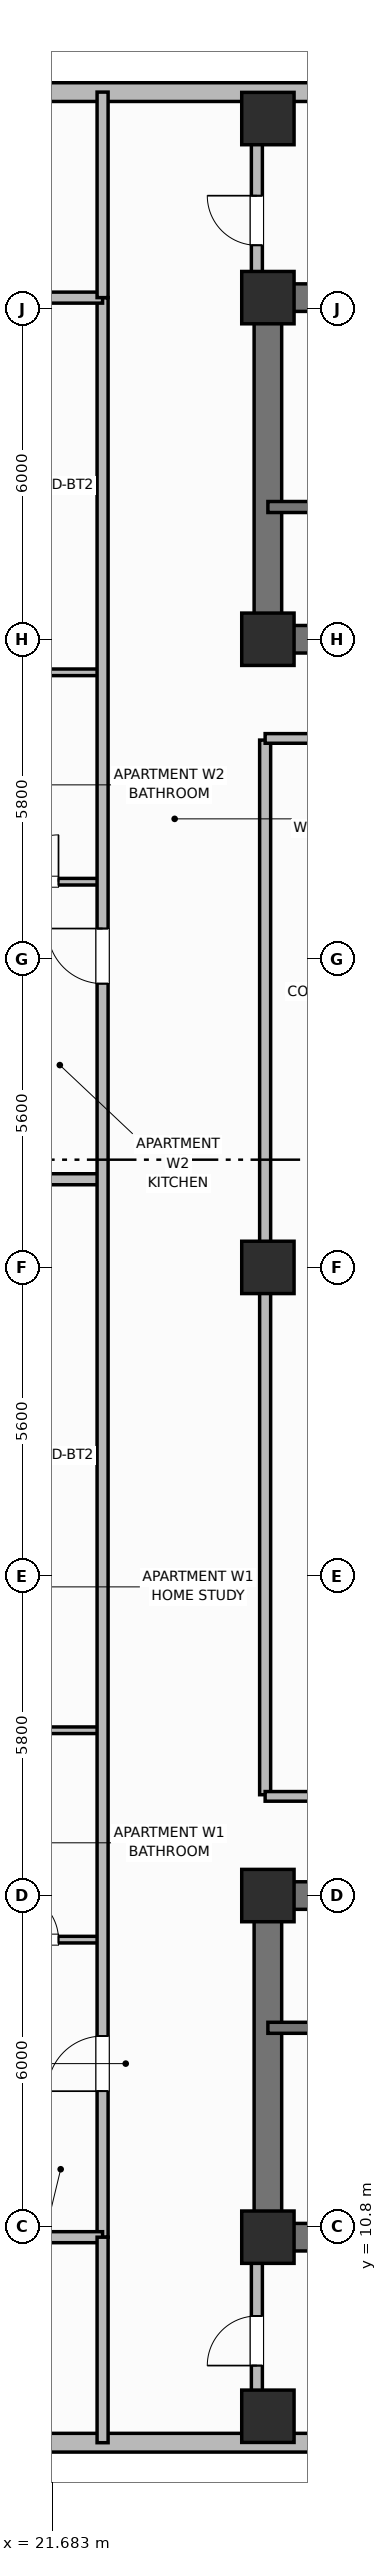
"""IFC4 building model, lengths in metres.
Left out: names, types, materials, properties, quantities, classifications, styles, units other than length and angle.
Written with IfcOpenShell. Run it as: python <this file> out.ifc"""

import sys

from ifc_helpers import new_model, si_unit, direction, frame, frame_2d, origin, origin_2d, place, context, subcontext, project, spatial, rectangle, extrude, element, fill, save


model = new_model("IFC4")
c1 = context("Model", 3, precision=1e-05, world=origin(), true_north=direction((0.0, 1.0)))
c2 = subcontext(c1, "Body", "Model", "MODEL_VIEW")
j1 = project(units=[si_unit("LENGTHUNIT", "METRE"), si_unit("PLANEANGLEUNIT", "RADIAN")], contexts=[c1])
p1 = place(None, origin())
s1 = spatial("IfcSite", under=j1, at=p1, CompositionType="ELEMENT")
p2 = place(p1, origin())
s2 = spatial("IfcBuilding", under=s1, at=p2, CompositionType="ELEMENT")
p3 = place(p2, frame((0.0, 0.0, 177.4)))
s3 = spatial("IfcBuildingStorey", under=s2, at=p3, CompositionType="ELEMENT", Elevation=177.4)
p4 = place(p3, frame((52.8, 10.6, 0.0), z_axis=(0.0, 0.0, 1.0), x_axis=(-1.0, 0.0, 0.0)))
e1 = element("IfcWall", 1, at=p4, inside=s3, PredefinedType="SHEAR", context=c2, shape_type="SweptSolid", body=[
    extrude(rectangle(XDim=27.2, YDim=0.5, at=frame_2d((13.6, 0.0))), origin(), (0.0, 0.0, 1.0), 3.7),
])
p5 = place(p3, frame((25.6, 10.85, 0.0), z_axis=(0.0, 0.0, 1.0), x_axis=(0.0, 1.0, 0.0)))
e2 = element("IfcWall", 2, at=p5, inside=s3, PredefinedType="SHEAR", context=c2, shape_type="SweptSolid", body=[
    extrude(rectangle(XDim=5.7, YDim=0.5, at=frame_2d((2.85, 0.0))), origin(), (0.0, 0.0, 1.0), 3.7),
])
p6 = place(p3, frame((25.6, 16.8, 0.0), z_axis=(0.0, 0.0, 1.0), x_axis=(1.0, 0.0, 0.0)))
e3 = element("IfcWall", 3, at=p6, inside=s3, PredefinedType="SHEAR", context=c2, shape_type="SweptSolid", body=[
    extrude(rectangle(XDim=27.2, YDim=0.5, at=frame_2d((13.6, 0.0))), origin(), (0.0, 0.0, 1.0), 3.7),
])
p7 = place(p6, frame((1.9, 0.0, 0.0)))
e4 = element("IfcOpeningElement", 4, at=p7, cuts=e3, PredefinedType="OPENING", context=c2, shape_type="SweptSolid", body=[
    extrude(rectangle(XDim=1.1, YDim=2.15, at=frame_2d((0.55, 1.075))), frame((0.0, 0.26, 0.0), z_axis=(0.0, -1.0, 0.0), x_axis=(1.0, 0.0, 0.0)), (0.0, 0.0, 1.0), 0.52),
])
p8 = place(p6, frame((13.0, 0.0, 0.0)))
e5 = element("IfcOpeningElement", 5, at=p8, cuts=e3, PredefinedType="OPENING", context=c2, shape_type="SweptSolid", body=[
    extrude(rectangle(XDim=1.2, YDim=2.15, at=frame_2d((0.6, 1.075))), frame((0.0, 0.26, 0.0), z_axis=(0.0, -1.0, 0.0), x_axis=(1.0, 0.0, 0.0)), (0.0, 0.0, 1.0), 0.52),
])
p9 = place(p6, frame((21.6, 0.0, 0.0)))
e6 = element("IfcOpeningElement", 6, at=p9, cuts=e3, PredefinedType="OPENING", context=c2, shape_type="SweptSolid", body=[
    extrude(rectangle(XDim=1.0, YDim=2.15, at=frame_2d((0.5, 1.075))), frame((0.0, 0.26, 0.0), z_axis=(0.0, -1.0, 0.0), x_axis=(1.0, 0.0, 0.0)), (0.0, 0.0, 1.0), 0.52),
])
p10 = place(p3, frame((25.6, 45.8, 0.0), z_axis=(0.0, 0.0, 1.0), x_axis=(1.0, 0.0, 0.0)))
e7 = element("IfcWall", 7, at=p10, inside=s3, PredefinedType="SHEAR", context=c2, shape_type="SweptSolid", body=[
    extrude(rectangle(XDim=27.2, YDim=0.5, at=frame_2d((13.6, 0.0))), origin(), (0.0, 0.0, 1.0), 3.7),
])
p11 = place(p3, frame((25.6, 39.85, 0.0), z_axis=(0.0, 0.0, 1.0), x_axis=(0.0, 1.0, 0.0)))
e8 = element("IfcWall", 8, at=p11, inside=s3, PredefinedType="SHEAR", context=c2, shape_type="SweptSolid", body=[
    extrude(rectangle(XDim=5.7, YDim=0.5, at=frame_2d((2.85, 0.0))), origin(), (0.0, 0.0, 1.0), 3.7),
])
p12 = place(p3, frame((52.8, 39.6, 0.0), z_axis=(0.0, 0.0, 1.0), x_axis=(-1.0, 0.0, 0.0)))
e9 = element("IfcWall", 9, at=p12, inside=s3, PredefinedType="SHEAR", context=c2, shape_type="SweptSolid", body=[
    extrude(rectangle(XDim=27.2, YDim=0.5, at=frame_2d((13.6, 0.0))), origin(), (0.0, 0.0, 1.0), 3.7),
])
p13 = place(p12, frame((24.2, 0.0, 0.0)))
e10 = element("IfcOpeningElement", 10, at=p13, cuts=e9, PredefinedType="OPENING", context=c2, shape_type="SweptSolid", body=[
    extrude(rectangle(XDim=1.1, YDim=2.15, at=frame_2d((0.55, 1.075))), frame((0.0, 0.26, 0.0), z_axis=(0.0, -1.0, 0.0), x_axis=(1.0, 0.0, 0.0)), (0.0, 0.0, 1.0), 0.52),
])
p14 = place(p12, frame((15.1, 0.0, 0.0)))
e11 = element("IfcOpeningElement", 11, at=p14, cuts=e9, PredefinedType="OPENING", context=c2, shape_type="SweptSolid", body=[
    extrude(rectangle(XDim=1.2, YDim=2.15, at=frame_2d((0.6, 1.075))), frame((0.0, 0.26, 0.0), z_axis=(0.0, -1.0, 0.0), x_axis=(1.0, 0.0, 0.0)), (0.0, 0.0, 1.0), 0.52),
])
p15 = place(p12, frame((11.6, 0.0, 0.0)))
e12 = element("IfcOpeningElement", 12, at=p15, cuts=e9, PredefinedType="OPENING", context=c2, shape_type="SweptSolid", body=[
    extrude(rectangle(XDim=0.9, YDim=2.1, at=frame_2d((0.45, 1.05))), frame((0.0, 0.26, 0.0), z_axis=(0.0, -1.0, 0.0), x_axis=(1.0, 0.0, 0.0)), (0.0, 0.0, 1.0), 0.52),
])
p16 = place(p12, frame((7.35, 0.0, 0.0)))
e13 = element("IfcOpeningElement", 13, at=p16, cuts=e9, PredefinedType="OPENING", context=c2, shape_type="SweptSolid", body=[
    extrude(rectangle(XDim=0.85, YDim=2.1, at=frame_2d((0.425, 1.05))), frame((0.0, 0.26, 0.0), z_axis=(0.0, -1.0, 0.0), x_axis=(1.0, 0.0, 0.0)), (0.0, 0.0, 1.0), 0.52),
])
p17 = place(p12, frame((3.6, 0.0, 0.0)))
e14 = element("IfcOpeningElement", 14, at=p17, cuts=e9, PredefinedType="OPENING", context=c2, shape_type="SweptSolid", body=[
    extrude(rectangle(XDim=1.0, YDim=2.15, at=frame_2d((0.5, 1.075))), frame((0.0, 0.26, 0.0), z_axis=(0.0, -1.0, 0.0), x_axis=(1.0, 0.0, 0.0)), (0.0, 0.0, 1.0), 0.52),
])
for number, where, z_axis, x_axis in (
    (15, (25.6, 10.6, 0.0), (0.0, 0.0, 1.0), (1.0, 0.0, 0.0)),
    (16, (25.6, 16.8, 0.0), (0.0, 0.0, 1.0), (1.0, 0.0, 0.0)),
    (17, (25.6, 39.6, 0.0), (0.0, 0.0, 1.0), (1.0, 0.0, 0.0)),
    (18, (25.6, 45.8, 0.0), (0.0, 0.0, 1.0), (1.0, 0.0, 0.0)),
    (19, (25.6, 28.2, 0.0), (0.0, 0.0, 1.0), (1.0, 0.0, 0.0)),
    (20, (25.6, 7.35, 0.0), (0.0, 0.0, 1.0), (1.0, 0.0, 0.0)),
    (21, (25.6, 49.05, 0.0), (0.0, 0.0, 1.0), (1.0, 0.0, 0.0)),
):
    element("IfcColumn", number, at=place(p3, frame(where, z_axis=z_axis, x_axis=x_axis)), inside=s3, PredefinedType="COLUMN", context=c2, shape_type="SweptSolid", body=[
        extrude(rectangle(XDim=0.95, YDim=0.95, at=origin_2d()), origin(), (0.0, 0.0, 1.0), 3.7),
    ])
p18 = place(p3, frame((20.2, 6.87, 0.0), z_axis=(0.0, 0.0, 1.0), x_axis=(1.0, 0.0, 0.0)))
e22 = element("IfcWall", 22, at=p18, inside=s3, PredefinedType="SOLIDWALL", context=c2, shape_type="SweptSolid", body=[
    extrude(rectangle(XDim=15.8, YDim=0.34, at=frame_2d((7.9, 0.0))), origin(), (0.0, 0.0, 1.0), 2.72),
])
p19 = place(p18, frame((7.962, 0.0, 0.7)))
e23 = element("IfcOpeningElement", 23, at=p19, cuts=e22, PredefinedType="OPENING", context=c2, shape_type="SweptSolid", body=[
    extrude(rectangle(XDim=2.1, YDim=1.9, at=frame_2d((1.05, 0.95))), frame((0.0, 0.18, 0.0), z_axis=(0.0, -1.0, 0.0), x_axis=(1.0, 0.0, 0.0)), (0.0, 0.0, 1.0), 0.36),
])
p20 = place(p18, frame((11.587, 0.0, 0.7)))
e24 = element("IfcOpeningElement", 24, at=p20, cuts=e22, PredefinedType="OPENING", context=c2, shape_type="SweptSolid", body=[
    extrude(rectangle(XDim=2.1, YDim=1.9, at=frame_2d((1.05, 0.95))), frame((0.0, 0.18, 0.0), z_axis=(0.0, -1.0, 0.0), x_axis=(1.0, 0.0, 0.0)), (0.0, 0.0, 1.0), 0.36),
])
p21 = place(p3, frame((27.55, 49.53, 0.0), z_axis=(0.0, 0.0, 1.0), x_axis=(-1.0, 0.0, 0.0)))
e25 = element("IfcWall", 25, at=p21, inside=s3, PredefinedType="SOLIDWALL", context=c2, shape_type="SweptSolid", body=[
    extrude(rectangle(XDim=7.35, YDim=0.34, at=frame_2d((3.675, 0.0))), origin(), (0.0, 0.0, 1.0), 2.72),
])
p22 = place(p3, frame((25.6, 14.4, 0.0), z_axis=(0.0, 0.0, 1.0), x_axis=(1.0, 0.0, 0.0)))
e26 = element("IfcWall", 26, at=p22, inside=s3, PredefinedType="SHEAR", context=c2, shape_type="SweptSolid", body=[
    extrude(rectangle(XDim=9.55, YDim=0.2, at=frame_2d((4.775, 0.0))), origin(), (0.0, 0.0, 1.0), 3.7),
])
p23 = place(p22, frame((1.05, 0.0, 0.0)))
e27 = element("IfcOpeningElement", 27, at=p23, cuts=e26, PredefinedType="OPENING", context=c2, shape_type="SweptSolid", body=[
    extrude(rectangle(XDim=1.1, YDim=2.15, at=frame_2d((0.55, 1.075))), frame((0.0, 0.11, 0.0), z_axis=(0.0, -1.0, 0.0), x_axis=(1.0, 0.0, 0.0)), (0.0, 0.0, 1.0), 0.22),
])
p24 = place(p3, frame((35.15, 42.0, 0.0), z_axis=(0.0, 0.0, 1.0), x_axis=(-1.0, 0.0, 0.0)))
e28 = element("IfcWall", 28, at=p24, inside=s3, PredefinedType="SHEAR", context=c2, shape_type="SweptSolid", body=[
    extrude(rectangle(XDim=9.55, YDim=0.2, at=frame_2d((4.775, 0.0))), origin(), (0.0, 0.0, 1.0), 3.7),
])
p25 = place(p24, frame((7.25, 0.0, 0.0)))
e29 = element("IfcOpeningElement", 29, at=p25, cuts=e28, PredefinedType="OPENING", context=c2, shape_type="SweptSolid", body=[
    extrude(rectangle(XDim=1.1, YDim=2.15, at=frame_2d((0.55, 1.075))), frame((0.0, 0.11, 0.0), z_axis=(0.0, -1.0, 0.0), x_axis=(1.0, 0.0, 0.0)), (0.0, 0.0, 1.0), 0.22),
])
p26 = place(p3, frame((25.55, 18.63, 0.0), z_axis=(0.0, 0.0, 1.0), x_axis=(0.0, 1.0, 0.0)))
e30 = element("IfcWall", 30, at=p26, inside=s3, PredefinedType="PARTITIONING", context=c2, shape_type="SweptSolid", body=[
    extrude(rectangle(XDim=19.14, YDim=0.2, at=frame_2d((9.57, 0.0))), origin(), (0.0, 0.0, 1.0), 2.55),
])
for number, where, z_axis, x_axis in (
    (31, (25.55, 18.6, 0.0), (0.0, 0.0, 1.0), (1.0, 0.0, 0.0)),
    (32, (25.55, 37.8, 0.0), (0.0, 0.0, 1.0), (1.0, 0.0, 0.0)),
):
    element("IfcWall", number, at=place(p3, frame(where, z_axis=z_axis, x_axis=x_axis)), inside=s3, PredefinedType="PARTITIONING", context=c2, shape_type="SweptSolid", body=[
        extrude(rectangle(XDim=3.5, YDim=0.175, at=frame_2d((1.75, 0.0))), origin(), (0.0, 0.0, 1.0), 2.55),
    ])
p27 = place(p3, frame((20.35, 16.0, 0.0), z_axis=(0.0, 0.0, 1.0), x_axis=(1.0, 0.0, 0.0)))
e33 = element("IfcWall", 33, at=p27, inside=s3, PredefinedType="PARTITIONING", context=c2, shape_type="SweptSolid", body=[
    extrude(rectangle(XDim=2.25, YDim=0.12, at=frame_2d((1.125, 0.0))), origin(), (0.0, 0.0, 1.0), 2.55),
])
p28 = place(p27, frame((0.6, 0.0, 0.0)))
e34 = element("IfcOpeningElement", 34, at=p28, cuts=e33, PredefinedType="OPENING", context=c2, shape_type="SweptSolid", body=[
    extrude(rectangle(XDim=0.85, YDim=2.1, at=frame_2d((0.425, 1.05))), frame((0.0, 0.07, 0.0), z_axis=(0.0, -1.0, 0.0), x_axis=(1.0, 0.0, 0.0)), (0.0, 0.0, 1.0), 0.14),
])
p29 = place(p3, frame((20.35, 19.8, 0.0), z_axis=(0.0, 0.0, 1.0), x_axis=(1.0, 0.0, 0.0)))
e35 = element("IfcWall", 35, at=p29, inside=s3, PredefinedType="PARTITIONING", context=c2, shape_type="SweptSolid", body=[
    extrude(rectangle(XDim=2.25, YDim=0.12, at=frame_2d((1.125, 0.0))), origin(), (0.0, 0.0, 1.0), 2.55),
])
p30 = place(p3, frame((16.97, 29.8, 0.0), z_axis=(0.0, 0.0, 1.0), x_axis=(1.0, 0.0, 0.0)))
e36 = element("IfcWall", 36, at=p30, inside=s3, PredefinedType="PARTITIONING", context=c2, shape_type="SweptSolid", body=[
    extrude(rectangle(XDim=5.63, YDim=0.2, at=frame_2d((2.815, 0.0))), origin(), (0.0, 0.0, 1.0), 2.55),
])
p31 = place(p3, frame((20.35, 35.2, 0.0), z_axis=(0.0, 0.0, 1.0), x_axis=(1.0, 0.0, 0.0)))
e37 = element("IfcWall", 37, at=p31, inside=s3, PredefinedType="PARTITIONING", context=c2, shape_type="SweptSolid", body=[
    extrude(rectangle(XDim=2.25, YDim=0.12, at=frame_2d((1.125, 0.0))), origin(), (0.0, 0.0, 1.0), 2.55),
])
p32 = place(p31, frame((0.6, 0.0, 0.0)))
e38 = element("IfcOpeningElement", 38, at=p32, cuts=e37, PredefinedType="OPENING", context=c2, shape_type="SweptSolid", body=[
    extrude(rectangle(XDim=0.85, YDim=2.1, at=frame_2d((0.425, 1.05))), frame((0.0, 0.07, 0.0), z_axis=(0.0, -1.0, 0.0), x_axis=(1.0, 0.0, 0.0)), (0.0, 0.0, 1.0), 0.14),
])
p33 = place(p3, frame((20.35, 39.0, 0.0), z_axis=(0.0, 0.0, 1.0), x_axis=(1.0, 0.0, 0.0)))
e39 = element("IfcWall", 39, at=p33, inside=s3, PredefinedType="PARTITIONING", context=c2, shape_type="SweptSolid", body=[
    extrude(rectangle(XDim=2.25, YDim=0.12, at=frame_2d((1.125, 0.0))), origin(), (0.0, 0.0, 1.0), 2.55),
])
p34 = place(p3, frame((22.6, 10.6, 0.0), z_axis=(0.0, 0.0, 1.0), x_axis=(0.0, 1.0, 0.0)))
e40 = element("IfcWall", 40, at=p34, inside=s3, PredefinedType="PARTITIONING", context=c2, shape_type="SweptSolid", body=[
    extrude(rectangle(XDim=35.2, YDim=0.2, at=frame_2d((17.6, 0.0))), origin(), (0.0, 0.0, 1.0), 2.55),
])
p35 = place(p34, frame((2.65, 0.0, 0.0)))
e41 = element("IfcOpeningElement", 41, at=p35, cuts=e40, PredefinedType="OPENING", context=c2, shape_type="SweptSolid", body=[
    extrude(rectangle(XDim=1.0, YDim=2.15, at=frame_2d((0.5, 1.075))), frame((0.0, 0.11, 0.0), z_axis=(0.0, -1.0, 0.0), x_axis=(1.0, 0.0, 0.0)), (0.0, 0.0, 1.0), 0.22),
])
p36 = place(p34, frame((22.75, 0.0, 0.0)))
e42 = element("IfcOpeningElement", 42, at=p36, cuts=e40, PredefinedType="OPENING", context=c2, shape_type="SweptSolid", body=[
    extrude(rectangle(XDim=1.0, YDim=2.15, at=frame_2d((0.5, 1.075))), frame((0.0, 0.11, 0.0), z_axis=(0.0, -1.0, 0.0), x_axis=(1.0, 0.0, 0.0)), (0.0, 0.0, 1.0), 0.22),
])
for number, where, z_axis, x_axis in (
    (43, (16.99, 10.6, 0.0), (0.0, 0.0, 1.0), (1.0, 0.0, 0.0)),
    (44, (16.99, 45.8, 0.0), (0.0, 0.0, 1.0), (1.0, 0.0, 0.0)),
):
    element("IfcWall", number, at=place(p3, frame(where, z_axis=z_axis, x_axis=x_axis)), inside=s3, PredefinedType="PARTITIONING", context=c2, shape_type="SweptSolid", body=[
        extrude(rectangle(XDim=5.61, YDim=0.2, at=frame_2d((2.805, 0.0))), origin(), (0.0, 0.0, 1.0), 2.55),
    ])
for number, where, z_axis, x_axis in (
    (45, (22.6, 6.87, 0.0), (0.0, 0.0, 1.0), (0.0, 1.0, 0.0)),
    (46, (22.6, 45.8, 0.0), (0.0, 0.0, 1.0), (0.0, 1.0, 0.0)),
):
    element("IfcWall", number, at=place(p3, frame(where, z_axis=z_axis, x_axis=x_axis)), inside=s3, PredefinedType="PARTITIONING", context=c2, shape_type="SweptSolid", body=[
        extrude(rectangle(XDim=3.73, YDim=0.2, at=frame_2d((1.865, 0.0))), origin(), (0.0, 0.0, 1.0), 2.55),
    ])
p37 = place(p3, frame((25.4, 7.62, 0.0), z_axis=(0.0, 0.0, 1.0), x_axis=(0.0, 1.0, 0.0)))
e47 = element("IfcWall", 47, at=p37, inside=s3, PredefinedType="PARTITIONING", context=c2, shape_type="SweptSolid", body=[
    extrude(rectangle(XDim=2.68, YDim=0.2, at=frame_2d((1.34, 0.0))), origin(), (0.0, 0.0, 1.0), 2.55),
])
p38 = place(p37, frame((0.65, 0.0, 0.0)))
e48 = element("IfcOpeningElement", 48, at=p38, cuts=e47, PredefinedType="OPENING", context=c2, shape_type="SweptSolid", body=[
    extrude(rectangle(XDim=0.9, YDim=2.1, at=frame_2d((0.45, 1.05))), frame((0.0, 0.11, 0.0), z_axis=(0.0, -1.0, 0.0), x_axis=(1.0, 0.0, 0.0)), (0.0, 0.0, 1.0), 0.22),
])
p39 = place(p3, frame((25.4, 46.1, 0.0), z_axis=(0.0, 0.0, 1.0), x_axis=(0.0, 1.0, 0.0)))
e49 = element("IfcWall", 49, at=p39, inside=s3, PredefinedType="PARTITIONING", context=c2, shape_type="SweptSolid", body=[
    extrude(rectangle(XDim=2.68, YDim=0.2, at=frame_2d((1.34, 0.0))), origin(), (0.0, 0.0, 1.0), 2.55),
])
p40 = place(p39, frame((0.65, 0.0, 0.0)))
e50 = element("IfcOpeningElement", 50, at=p40, cuts=e49, PredefinedType="OPENING", context=c2, shape_type="SweptSolid", body=[
    extrude(rectangle(XDim=0.9, YDim=2.1, at=frame_2d((0.45, 1.05))), frame((0.0, 0.11, 0.0), z_axis=(0.0, -1.0, 0.0), x_axis=(1.0, 0.0, 0.0)), (0.0, 0.0, 1.0), 0.22),
])
p41 = place(p28, origin())
e51 = element("IfcDoor", 51, at=p41, inside=s3, OperationType="SINGLE_SWING_LEFT", PredefinedType="DOOR", context=c2, shape_type="SweptSolid", body=[
    extrude(rectangle(XDim=0.85, YDim=2.1, at=frame_2d((0.425, 1.05))), frame((0.0, 0.025, 0.0), z_axis=(0.0, -1.0, 0.0), x_axis=(1.0, 0.0, 0.0)), (0.0, 0.0, 1.0), 0.05),
])
fill(e34, e51)
p42 = place(p32, origin())
e52 = element("IfcDoor", 52, at=p42, inside=s3, OperationType="SINGLE_SWING_RIGHT", PredefinedType="DOOR", context=c2, shape_type="SweptSolid", body=[
    extrude(rectangle(XDim=0.85, YDim=2.1, at=frame_2d((0.425, 1.05))), frame((0.0, 0.025, 0.0), z_axis=(0.0, -1.0, 0.0), x_axis=(1.0, 0.0, 0.0)), (0.0, 0.0, 1.0), 0.05),
])
fill(e38, e52)
p43 = place(p35, origin())
e53 = element("IfcDoor", 53, at=p43, inside=s3, OperationType="SINGLE_SWING_LEFT", PredefinedType="DOOR", context=c2, shape_type="SweptSolid", body=[
    extrude(rectangle(XDim=1.0, YDim=2.15, at=frame_2d((0.5, 1.075))), frame((0.0, 0.025, 0.0), z_axis=(0.0, -1.0, 0.0), x_axis=(1.0, 0.0, 0.0)), (0.0, 0.0, 1.0), 0.05),
])
fill(e41, e53)
p44 = place(p36, origin())
e54 = element("IfcDoor", 54, at=p44, inside=s3, OperationType="SINGLE_SWING_RIGHT", PredefinedType="DOOR", context=c2, shape_type="SweptSolid", body=[
    extrude(rectangle(XDim=1.0, YDim=2.15, at=frame_2d((0.5, 1.075))), frame((0.0, 0.025, 0.0), z_axis=(0.0, -1.0, 0.0), x_axis=(1.0, 0.0, 0.0)), (0.0, 0.0, 1.0), 0.05),
])
fill(e42, e54)
p45 = place(p38, origin())
e55 = element("IfcDoor", 55, at=p45, inside=s3, OperationType="SINGLE_SWING_LEFT", PredefinedType="DOOR", context=c2, shape_type="SweptSolid", body=[
    extrude(rectangle(XDim=0.9, YDim=2.1, at=frame_2d((0.45, 1.05))), frame((0.0, 0.025, 0.0), z_axis=(0.0, -1.0, 0.0), x_axis=(1.0, 0.0, 0.0)), (0.0, 0.0, 1.0), 0.05),
])
fill(e48, e55)
p46 = place(p40, origin())
e56 = element("IfcDoor", 56, at=p46, inside=s3, OperationType="SINGLE_SWING_RIGHT", PredefinedType="DOOR", context=c2, shape_type="SweptSolid", body=[
    extrude(rectangle(XDim=0.9, YDim=2.1, at=frame_2d((0.45, 1.05))), frame((0.0, 0.025, 0.0), z_axis=(0.0, -1.0, 0.0), x_axis=(1.0, 0.0, 0.0)), (0.0, 0.0, 1.0), 0.05),
])
fill(e50, e56)
save(model, sys.argv[1])
